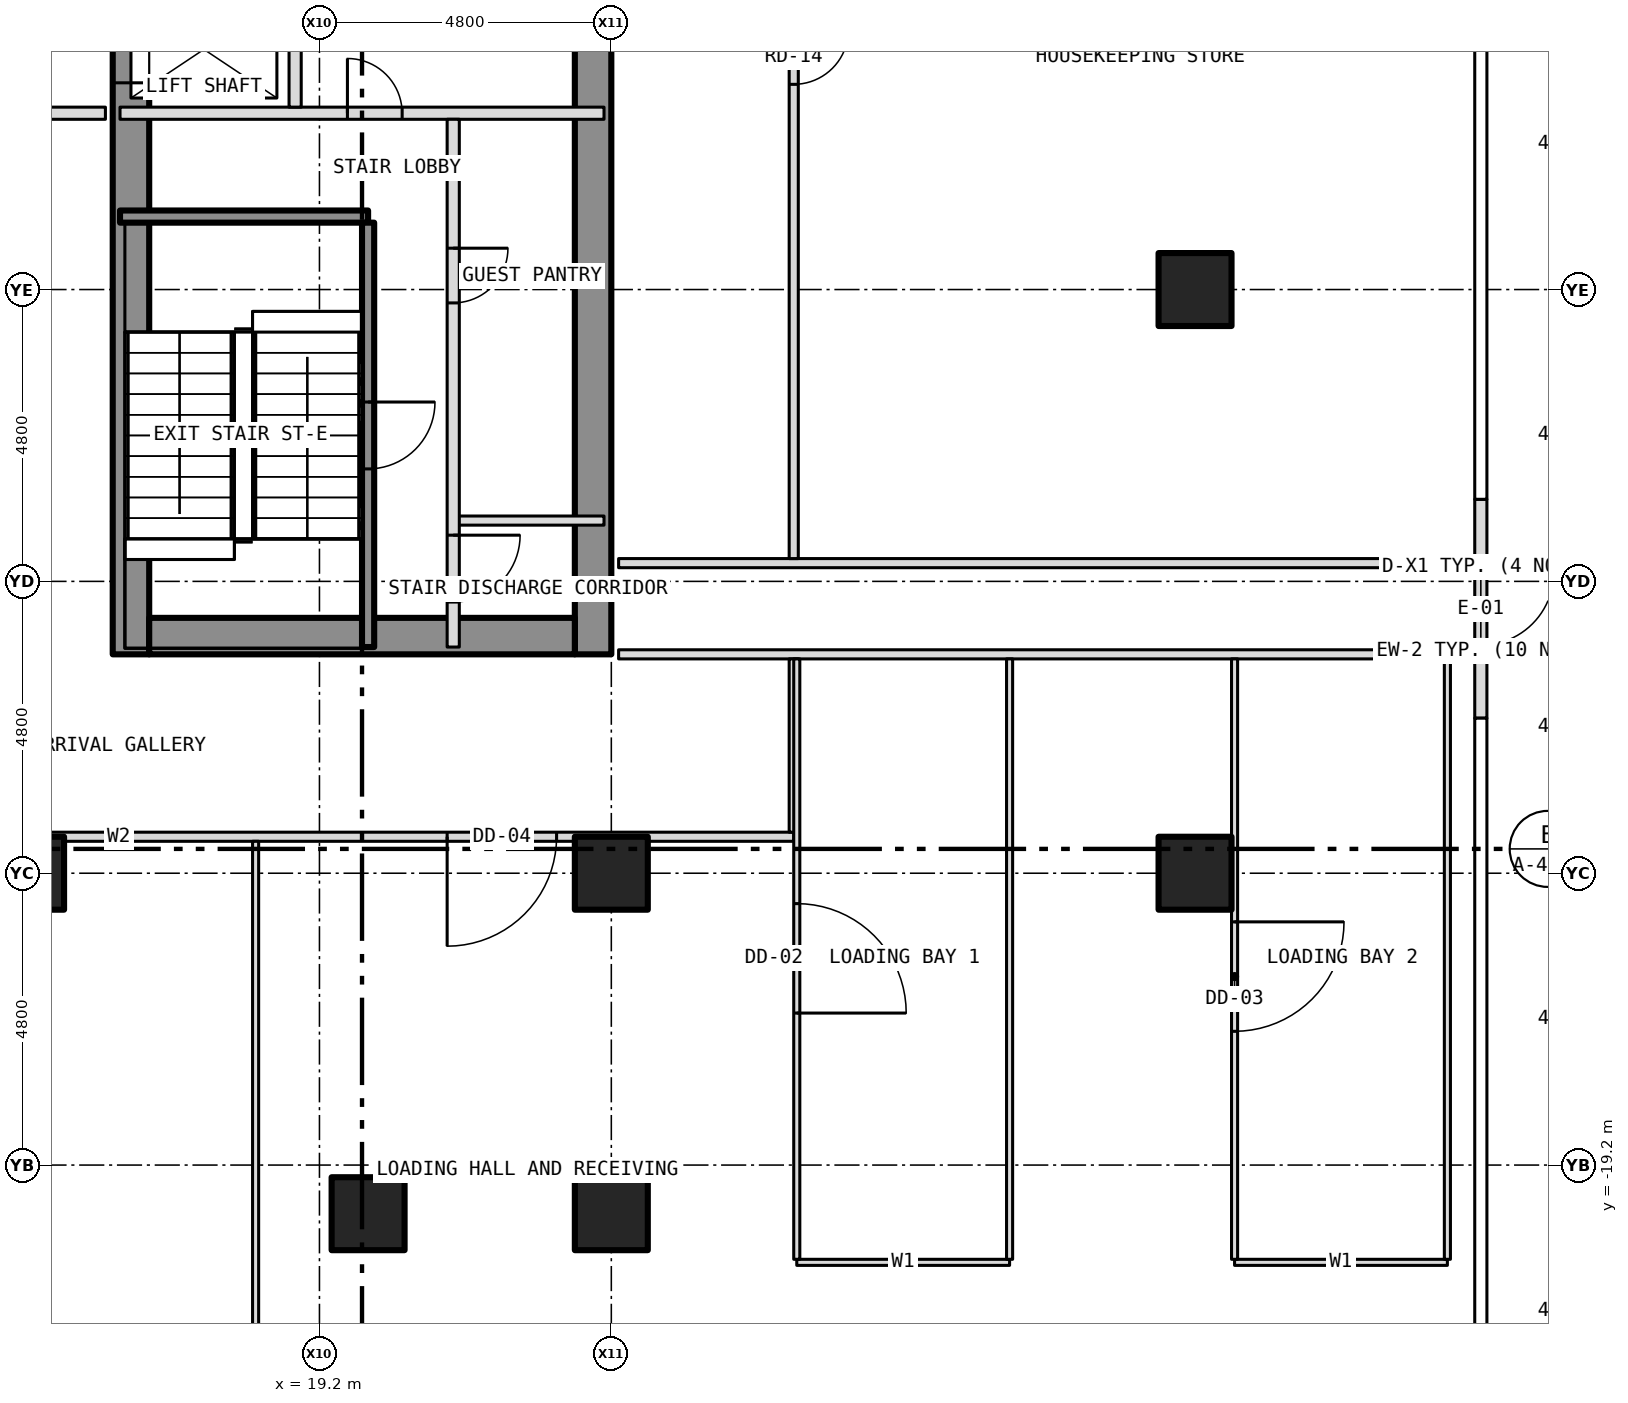
"""IFC4 building model, lengths in metres.
Left out: names, types, materials, properties, quantities, classifications, styles, units other than length and angle.
Written with IfcOpenShell. Run it as: python <this file> out.ifc"""

import sys

from ifc_helpers import new_model, si_unit, direction, frame, frame_2d, origin, origin_2d, place, context, subcontext, project, spatial, rectangle, hollow_rectangle, extrude, element, fill, save


model = new_model("IFC4")
c1 = context("Model", 3, precision=1e-05, world=origin(), true_north=direction((0.0, 1.0)))
c2 = subcontext(c1, "Body", "Model", "MODEL_VIEW")
j1 = project(units=[si_unit("LENGTHUNIT", "METRE"), si_unit("PLANEANGLEUNIT", "RADIAN")], contexts=[c1])
p1 = place(None, origin())
s1 = spatial("IfcSite", under=j1, at=p1, CompositionType="ELEMENT")
p2 = place(p1, origin())
s2 = spatial("IfcBuilding", under=s1, at=p2, CompositionType="ELEMENT")
p3 = place(p2, origin())
s3 = spatial("IfcBuildingStorey", under=s2, at=p3, CompositionType="ELEMENT", Elevation=0.0)
for number, where, z_axis, x_axis in (
    (1, (33.6, -14.4, -0.3), (0.0, 0.0, 1.0), (1.0, 0.0, 0.0)),
    (2, (33.6, -4.8, -0.3), (0.0, 0.0, 1.0), (1.0, 0.0, 0.0)),
    (3, (14.4, -14.4, -0.3), (0.0, 0.0, 1.0), (1.0, 0.0, 0.0)),
    (4, (20.0, -20.0, -0.3), (0.0, 0.0, 1.0), (1.0, 0.0, 0.0)),
    (5, (24.0, -20.0, -0.3), (0.0, 0.0, 1.0), (1.0, 0.0, 0.0)),
    (6, (24.0, -14.4, -0.3), (0.0, 0.0, 1.0), (1.0, 0.0, 0.0)),
):
    element("IfcColumn", number, at=place(p3, frame(where, z_axis=z_axis, x_axis=x_axis)), inside=s3, PredefinedType="COLUMN", context=c2, shape_type="SweptSolid", body=[
        extrude(hollow_rectangle(XDim=1.2, YDim=1.2, WallThickness=0.07, at=origin_2d()), origin(), (0.0, 0.0, 1.0), 7.55),
    ])
p4 = place(p3, frame((16.1, -10.8, 0.0), z_axis=(0.0, 0.0, 1.0), x_axis=(0.0, 1.0, 0.0)))
e7 = element("IfcWall", 7, at=p4, inside=s3, PredefinedType="SHEAR", context=c2, shape_type="SweptSolid", body=[
    extrude(rectangle(XDim=21.6, YDim=0.6, at=frame_2d((10.8, 0.0))), origin(), (0.0, 0.0, 1.0), 7.2),
])
p5 = place(p4, frame((9.4, 0.0, 0.0)))
e8 = element("IfcOpeningElement", 8, at=p5, cuts=e7, PredefinedType="OPENING", context=c2, shape_type="SweptSolid", body=[
    extrude(rectangle(XDim=1.1, YDim=2.1, at=frame_2d((0.55, 1.05))), frame((0.0, 0.312, 0.0), z_axis=(0.0, -1.0, 0.0), x_axis=(1.0, 0.0, 0.0)), (0.0, 0.0, 1.0), 0.624),
])
p6 = place(p4, frame((11.5, 0.0, 0.0)))
e9 = element("IfcOpeningElement", 9, at=p6, cuts=e7, PredefinedType="OPENING", context=c2, shape_type="SweptSolid", body=[
    extrude(rectangle(XDim=1.1, YDim=2.1, at=frame_2d((0.55, 1.05))), frame((0.0, 0.312, 0.0), z_axis=(0.0, -1.0, 0.0), x_axis=(1.0, 0.0, 0.0)), (0.0, 0.0, 1.0), 0.624),
])
p7 = place(p4, frame((13.6, 0.0, 0.0)))
e10 = element("IfcOpeningElement", 10, at=p7, cuts=e7, PredefinedType="OPENING", context=c2, shape_type="SweptSolid", body=[
    extrude(rectangle(XDim=1.1, YDim=2.1, at=frame_2d((0.55, 1.05))), frame((0.0, 0.312, 0.0), z_axis=(0.0, -1.0, 0.0), x_axis=(1.0, 0.0, 0.0)), (0.0, 0.0, 1.0), 0.624),
])
p8 = place(p4, frame((15.7, 0.0, 0.0)))
e11 = element("IfcOpeningElement", 11, at=p8, cuts=e7, PredefinedType="OPENING", context=c2, shape_type="SweptSolid", body=[
    extrude(rectangle(XDim=1.1, YDim=2.1, at=frame_2d((0.55, 1.05))), frame((0.0, 0.312, 0.0), z_axis=(0.0, -1.0, 0.0), x_axis=(1.0, 0.0, 0.0)), (0.0, 0.0, 1.0), 0.624),
])
p9 = place(p4, frame((17.8, 0.0, 0.0)))
e12 = element("IfcOpeningElement", 12, at=p9, cuts=e7, PredefinedType="OPENING", context=c2, shape_type="SweptSolid", body=[
    extrude(rectangle(XDim=1.1, YDim=2.1, at=frame_2d((0.55, 1.05))), frame((0.0, 0.312, 0.0), z_axis=(0.0, -1.0, 0.0), x_axis=(1.0, 0.0, 0.0)), (0.0, 0.0, 1.0), 0.624),
])
p10 = place(p4, frame((19.9, 0.0, 0.0)))
e13 = element("IfcOpeningElement", 13, at=p10, cuts=e7, PredefinedType="OPENING", context=c2, shape_type="SweptSolid", body=[
    extrude(rectangle(XDim=1.1, YDim=2.1, at=frame_2d((0.55, 1.05))), frame((0.0, 0.312, 0.0), z_axis=(0.0, -1.0, 0.0), x_axis=(1.0, 0.0, 0.0)), (0.0, 0.0, 1.0), 0.624),
])
p11 = place(p3, frame((23.7, -10.8, 0.0), z_axis=(0.0, 0.0, 1.0), x_axis=(0.0, 1.0, 0.0)))
e14 = element("IfcWall", 14, at=p11, inside=s3, PredefinedType="SHEAR", context=c2, shape_type="SweptSolid", body=[
    extrude(rectangle(XDim=21.6, YDim=0.6, at=frame_2d((10.8, 0.0))), origin(), (0.0, 0.0, 1.0), 7.2),
])
p12 = place(p3, frame((16.4, -10.5, 0.0), z_axis=(0.0, 0.0, 1.0), x_axis=(1.0, 0.0, 0.0)))
e15 = element("IfcWall", 15, at=p12, inside=s3, PredefinedType="SHEAR", context=c2, shape_type="SweptSolid", body=[
    extrude(rectangle(XDim=7.0, YDim=0.6, at=frame_2d((3.5, 0.0))), origin(), (0.0, 0.0, 1.0), 7.2),
])
p13 = place(p3, frame((38.3, -8.25, 0.0), z_axis=(0.0, 0.0, 1.0), x_axis=(0.0, -1.0, 0.0)))
e16 = element("IfcWall", 16, at=p13, inside=s3, PredefinedType="SOLIDWALL", context=c2, shape_type="SweptSolid", body=[
    extrude(rectangle(XDim=3.6, YDim=0.2, at=frame_2d((1.8, 0.0))), origin(), (0.0, 0.0, 1.0), 6.628),
])
p14 = place(p13, frame((1.2, 0.0, 0.0)))
e17 = element("IfcOpeningElement", 17, at=p14, cuts=e16, PredefinedType="OPENING", context=c2, shape_type="SweptSolid", body=[
    extrude(rectangle(XDim=1.2, YDim=2.4, at=frame_2d((0.6, 1.2))), frame((0.0, 0.112, 0.0), z_axis=(0.0, -1.0, 0.0), x_axis=(1.0, 0.0, 0.0)), (0.0, 0.0, 1.0), 0.224),
])
for number, where, z_axis, x_axis in (
    (18, (27.05, -20.8, 0.0), (0.0, 0.0, 1.0), (1.0, 0.0, 0.0)),
    (19, (34.25, -20.8, 0.0), (0.0, 0.0, 1.0), (1.0, 0.0, 0.0)),
):
    element("IfcWall", number, at=place(p3, frame(where, z_axis=z_axis, x_axis=x_axis)), inside=s3, PredefinedType="PARTITIONING", context=c2, shape_type="SweptSolid", body=[
        extrude(rectangle(XDim=3.5, YDim=0.1, at=frame_2d((1.75, 0.0))), origin(), (0.0, 0.0, 1.0), 7.25),
    ])
p15 = place(p3, frame((4.8, -13.8, 0.0), z_axis=(0.0, 0.0, 1.0), x_axis=(1.0, 0.0, 0.0)))
e20 = element("IfcWall", 20, at=p15, inside=s3, PredefinedType="PARTITIONING", context=c2, shape_type="SweptSolid", body=[
    extrude(rectangle(XDim=22.2, YDim=0.15, at=frame_2d((11.1, 0.0))), origin(), (0.0, 0.0, 1.0), 7.25),
])
p16 = place(p15, frame((8.036, 0.0, 0.0)))
e21 = element("IfcOpeningElement", 21, at=p16, cuts=e20, PredefinedType="OPENING", context=c2, shape_type="SweptSolid", body=[
    extrude(rectangle(XDim=0.9, YDim=2.1, at=frame_2d((0.45, 1.05))), frame((0.0, 0.087, 0.0), z_axis=(0.0, -1.0, 0.0), x_axis=(1.0, 0.0, 0.0)), (0.0, 0.0, 1.0), 0.174),
])
p17 = place(p15, frame((16.5, 0.0, 0.0)))
e22 = element("IfcOpeningElement", 22, at=p17, cuts=e20, PredefinedType="OPENING", context=c2, shape_type="SweptSolid", body=[
    extrude(rectangle(XDim=1.8, YDim=2.1, at=frame_2d((0.9, 1.05))), frame((0.0, 0.087, 0.0), z_axis=(0.0, -1.0, 0.0), x_axis=(1.0, 0.0, 0.0)), (0.0, 0.0, 1.0), 0.174),
])
for number, where, z_axis, x_axis in (
    (23, (24.12, -10.8, 0.0), (0.0, 0.0, 1.0), (1.0, 0.0, 0.0)),
    (24, (24.12, -9.3, 0.0), (0.0, 0.0, 1.0), (1.0, 0.0, 0.0)),
):
    element("IfcWall", number, at=place(p3, frame(where, z_axis=z_axis, x_axis=x_axis)), inside=s3, PredefinedType="PARTITIONING", context=c2, shape_type="SweptSolid", body=[
        extrude(rectangle(XDim=12.78, YDim=0.15, at=frame_2d((6.39, 0.0))), origin(), (0.0, 0.0, 1.0), 7.25),
    ])
p18 = place(p3, frame((21.4, -8.6, 0.0), z_axis=(0.0, 0.0, 1.0), x_axis=(1.0, 0.0, 0.0)))
e25 = element("IfcWall", 25, at=p18, inside=s3, PredefinedType="PARTITIONING", context=c2, shape_type="SweptSolid", body=[
    extrude(rectangle(XDim=2.48, YDim=0.15, at=frame_2d((1.24, 0.0))), origin(), (0.0, 0.0, 1.0), 7.2),
])
p19 = place(p3, frame((15.92, -3.6, 0.0), z_axis=(0.0, 0.0, 1.0), x_axis=(1.0, 0.0, 0.0)))
e26 = element("IfcWall", 26, at=p19, inside=s3, PredefinedType="SHEAR", context=c2, shape_type="SweptSolid", body=[
    extrude(rectangle(XDim=4.08, YDim=0.2, at=frame_2d((2.04, 0.0))), origin(), (0.0, 0.0, 1.0), 7.2),
])
p20 = place(p3, frame((12.4, -1.9, 0.0), z_axis=(0.0, 0.0, 1.0), x_axis=(1.0, 0.0, 0.0)))
e27 = element("IfcWall", 27, at=p20, inside=s3, PredefinedType="PARTITIONING", context=c2, shape_type="SweptSolid", body=[
    extrude(rectangle(XDim=3.28, YDim=0.2, at=frame_2d((1.64, 0.0))), origin(), (0.0, 0.0, 1.0), 7.25),
])
p21 = place(p3, frame((15.92, -1.9, 0.0), z_axis=(0.0, 0.0, 1.0), x_axis=(1.0, 0.0, 0.0)))
e28 = element("IfcWall", 28, at=p21, inside=s3, PredefinedType="PARTITIONING", context=c2, shape_type="SweptSolid", body=[
    extrude(rectangle(XDim=7.96, YDim=0.2, at=frame_2d((3.98, 0.0))), origin(), (0.0, 0.0, 1.0), 7.2),
])
p22 = place(p21, frame((3.74, 0.0, 0.0)))
e29 = element("IfcOpeningElement", 29, at=p22, cuts=e28, PredefinedType="OPENING", context=c2, shape_type="SweptSolid", body=[
    extrude(rectangle(XDim=0.9, YDim=2.1, at=frame_2d((0.45, 1.05))), frame((0.0, 0.112, 0.0), z_axis=(0.0, -1.0, 0.0), x_axis=(1.0, 0.0, 0.0)), (0.0, 0.0, 1.0), 0.224),
])
p23 = place(p3, frame((18.15, -24.63, 0.0), z_axis=(0.0, 0.0, 1.0), x_axis=(0.0, 1.0, 0.0)))
e30 = element("IfcWall", 30, at=p23, inside=s3, PredefinedType="PARTITIONING", context=c2, shape_type="SweptSolid", body=[
    extrude(rectangle(XDim=10.755, YDim=0.1, at=frame_2d((5.377, 0.0))), origin(), (0.0, 0.0, 1.0), 7.25),
])
p24 = place(p3, frame((18.8, -1.8, 0.0), z_axis=(0.0, 0.0, 1.0), x_axis=(0.0, 1.0, 0.0)))
e31 = element("IfcWall", 31, at=p24, inside=s3, PredefinedType="PARTITIONING", context=c2, shape_type="SweptSolid", body=[
    extrude(rectangle(XDim=12.48, YDim=0.2, at=frame_2d((6.24, 0.0))), origin(), (0.0, 0.0, 1.0), 7.2),
])
p25 = place(p3, frame((20.0, -10.68, 0.0), z_axis=(0.0, 0.0, 1.0), x_axis=(0.0, 1.0, 0.0)))
e32 = element("IfcWall", 32, at=p25, inside=s3, PredefinedType="SHEAR", context=c2, shape_type="SweptSolid", body=[
    extrude(rectangle(XDim=6.98, YDim=0.2, at=frame_2d((3.49, 0.0))), origin(), (0.0, 0.0, 1.0), 7.2),
])
p26 = place(p25, frame((2.93, 0.0, 0.0)))
e33 = element("IfcOpeningElement", 33, at=p26, cuts=e32, PredefinedType="OPENING", context=c2, shape_type="SweptSolid", body=[
    extrude(rectangle(XDim=1.1, YDim=2.1, at=frame_2d((0.55, 1.05))), frame((0.0, 0.112, 0.0), z_axis=(0.0, -1.0, 0.0), x_axis=(1.0, 0.0, 0.0)), (0.0, 0.0, 1.0), 0.224),
])
p27 = place(p3, frame((21.4, -10.68, 0.0), z_axis=(0.0, 0.0, 1.0), x_axis=(0.0, 1.0, 0.0)))
e34 = element("IfcWall", 34, at=p27, inside=s3, PredefinedType="PARTITIONING", context=c2, shape_type="SweptSolid", body=[
    extrude(rectangle(XDim=8.68, YDim=0.2, at=frame_2d((4.34, 0.0))), origin(), (0.0, 0.0, 1.0), 7.2),
])
p28 = place(p27, frame((5.66, 0.0, 0.0)))
e35 = element("IfcOpeningElement", 35, at=p28, cuts=e34, PredefinedType="OPENING", context=c2, shape_type="SweptSolid", body=[
    extrude(rectangle(XDim=0.9, YDim=2.1, at=frame_2d((0.45, 1.05))), frame((0.0, 0.112, 0.0), z_axis=(0.0, -1.0, 0.0), x_axis=(1.0, 0.0, 0.0)), (0.0, 0.0, 1.0), 0.224),
])
p29 = place(p27, frame((0.74, 0.0, 0.0)))
e36 = element("IfcOpeningElement", 36, at=p29, cuts=e34, PredefinedType="OPENING", context=c2, shape_type="SweptSolid", body=[
    extrude(rectangle(XDim=1.1, YDim=2.1, at=frame_2d((0.55, 1.05))), frame((0.0, 0.112, 0.0), z_axis=(0.0, -1.0, 0.0), x_axis=(1.0, 0.0, 0.0)), (0.0, 0.0, 1.0), 0.224),
])
p30 = place(p3, frame((27.0, -13.725, 0.0), z_axis=(0.0, 0.0, 1.0), x_axis=(0.0, 1.0, 0.0)))
e37 = element("IfcWall", 37, at=p30, inside=s3, PredefinedType="PARTITIONING", context=c2, shape_type="SweptSolid", body=[
    extrude(rectangle(XDim=2.85, YDim=0.15, at=frame_2d((1.425, 0.0))), origin(), (0.0, 0.0, 1.0), 7.25),
])
p31 = place(p3, frame((27.0, -9.225, 0.0), z_axis=(0.0, 0.0, 1.0), x_axis=(0.0, 1.0, 0.0)))
e38 = element("IfcWall", 38, at=p31, inside=s3, PredefinedType="PARTITIONING", context=c2, shape_type="SweptSolid", body=[
    extrude(rectangle(XDim=22.95, YDim=0.15, at=frame_2d((11.475, 0.0))), origin(), (0.0, 0.0, 1.0), 7.25),
])
p32 = place(p31, frame((7.8, 0.0, 0.0)))
e39 = element("IfcOpeningElement", 39, at=p32, cuts=e38, PredefinedType="OPENING", context=c2, shape_type="SweptSolid", body=[
    extrude(rectangle(XDim=0.9, YDim=2.1, at=frame_2d((0.45, 1.05))), frame((0.0, 0.087, 0.0), z_axis=(0.0, -1.0, 0.0), x_axis=(1.0, 0.0, 0.0)), (0.0, 0.0, 1.0), 0.174),
])
p33 = place(p31, frame((19.35, 0.0, 0.0)))
e40 = element("IfcOpeningElement", 40, at=p33, cuts=e38, PredefinedType="OPENING", context=c2, shape_type="SweptSolid", body=[
    extrude(rectangle(XDim=0.9, YDim=2.1, at=frame_2d((0.45, 1.05))), frame((0.0, 0.087, 0.0), z_axis=(0.0, -1.0, 0.0), x_axis=(1.0, 0.0, 0.0)), (0.0, 0.0, 1.0), 0.174),
])
p34 = place(p3, frame((27.05, -20.75, 0.0), z_axis=(0.0, 0.0, 1.0), x_axis=(0.0, 1.0, 0.0)))
e41 = element("IfcWall", 41, at=p34, inside=s3, PredefinedType="PARTITIONING", context=c2, shape_type="SweptSolid", body=[
    extrude(rectangle(XDim=9.875, YDim=0.1, at=frame_2d((4.938, 0.0))), origin(), (0.0, 0.0, 1.0), 7.25),
])
p35 = place(p34, frame((4.05, 0.0, 0.0)))
e42 = element("IfcOpeningElement", 42, at=p35, cuts=e41, PredefinedType="OPENING", context=c2, shape_type="SweptSolid", body=[
    extrude(rectangle(XDim=1.8, YDim=2.1, at=frame_2d((0.9, 1.05))), frame((0.0, 0.062, 0.0), z_axis=(0.0, -1.0, 0.0), x_axis=(1.0, 0.0, 0.0)), (0.0, 0.0, 1.0), 0.124),
])
p36 = place(p3, frame((30.55, -20.75, 0.0), z_axis=(0.0, 0.0, 1.0), x_axis=(0.0, 1.0, 0.0)))
e43 = element("IfcWall", 43, at=p36, inside=s3, PredefinedType="PARTITIONING", context=c2, shape_type="SweptSolid", body=[
    extrude(rectangle(XDim=9.875, YDim=0.1, at=frame_2d((4.938, 0.0))), origin(), (0.0, 0.0, 1.0), 7.25),
])
p37 = place(p3, frame((34.25, -20.75, 0.0), z_axis=(0.0, 0.0, 1.0), x_axis=(0.0, 1.0, 0.0)))
e44 = element("IfcWall", 44, at=p37, inside=s3, PredefinedType="PARTITIONING", context=c2, shape_type="SweptSolid", body=[
    extrude(rectangle(XDim=9.875, YDim=0.1, at=frame_2d((4.938, 0.0))), origin(), (0.0, 0.0, 1.0), 7.25),
])
p38 = place(p37, frame((3.75, 0.0, 0.0)))
e45 = element("IfcOpeningElement", 45, at=p38, cuts=e44, PredefinedType="OPENING", context=c2, shape_type="SweptSolid", body=[
    extrude(rectangle(XDim=1.8, YDim=2.1, at=frame_2d((0.9, 1.05))), frame((0.0, 0.062, 0.0), z_axis=(0.0, -1.0, 0.0), x_axis=(1.0, 0.0, 0.0)), (0.0, 0.0, 1.0), 0.124),
])
p39 = place(p3, frame((37.75, -20.75, 0.0), z_axis=(0.0, 0.0, 1.0), x_axis=(0.0, 1.0, 0.0)))
e46 = element("IfcWall", 46, at=p39, inside=s3, PredefinedType="PARTITIONING", context=c2, shape_type="SweptSolid", body=[
    extrude(rectangle(XDim=9.9, YDim=0.1, at=frame_2d((4.95, 0.0))), origin(), (0.0, 0.0, 1.0), 7.25),
])
p40 = place(p14, origin())
e47 = element("IfcDoor", 47, at=p40, inside=s3, OperationType="SINGLE_SWING_LEFT", PredefinedType="DOOR", context=c2, shape_type="SweptSolid", body=[
    extrude(rectangle(XDim=1.2, YDim=2.4, at=frame_2d((0.6, 1.2))), frame((0.0, 0.025, 0.0), z_axis=(0.0, -1.0, 0.0), x_axis=(1.0, 0.0, 0.0)), (0.0, 0.0, 1.0), 0.05),
])
fill(e17, e47)
p41 = place(p5, origin())
e48 = element("IfcDoor", 48, at=p41, inside=s3, OperationType="SLIDING_TO_LEFT", PredefinedType="DOOR", context=c2, shape_type="SweptSolid", body=[
    extrude(rectangle(XDim=1.1, YDim=2.1, at=frame_2d((0.55, 1.05))), frame((0.0, 0.025, 0.0), z_axis=(0.0, -1.0, 0.0), x_axis=(1.0, 0.0, 0.0)), (0.0, 0.0, 1.0), 0.05),
])
fill(e8, e48)
p42 = place(p28, origin())
e49 = element("IfcDoor", 49, at=p42, inside=s3, OperationType="SINGLE_SWING_RIGHT", PredefinedType="DOOR", context=c2, shape_type="SweptSolid", body=[
    extrude(rectangle(XDim=0.9, YDim=2.1, at=frame_2d((0.45, 1.05))), frame((0.0, 0.025, 0.0), z_axis=(0.0, -1.0, 0.0), x_axis=(1.0, 0.0, 0.0)), (0.0, 0.0, 1.0), 0.05),
])
fill(e35, e49)
p43 = place(p22, origin())
e50 = element("IfcDoor", 50, at=p43, inside=s3, OperationType="SINGLE_SWING_LEFT", PredefinedType="DOOR", context=c2, shape_type="SweptSolid", body=[
    extrude(rectangle(XDim=0.9, YDim=2.1, at=frame_2d((0.45, 1.05))), frame((0.0, 0.025, 0.0), z_axis=(0.0, -1.0, 0.0), x_axis=(1.0, 0.0, 0.0)), (0.0, 0.0, 1.0), 0.05),
])
fill(e29, e50)
p44 = place(p29, origin())
e51 = element("IfcDoor", 51, at=p44, inside=s3, OperationType="SINGLE_SWING_RIGHT", PredefinedType="DOOR", context=c2, shape_type="SweptSolid", body=[
    extrude(rectangle(XDim=1.1, YDim=2.1, at=frame_2d((0.55, 1.05))), frame((0.0, 0.025, 0.0), z_axis=(0.0, -1.0, 0.0), x_axis=(1.0, 0.0, 0.0)), (0.0, 0.0, 1.0), 0.05),
])
fill(e36, e51)
p45 = place(p26, origin())
e52 = element("IfcDoor", 52, at=p45, inside=s3, OperationType="SINGLE_SWING_RIGHT", PredefinedType="DOOR", context=c2, shape_type="SweptSolid", body=[
    extrude(rectangle(XDim=1.1, YDim=2.1, at=frame_2d((0.55, 1.05))), frame((0.0, 0.025, 0.0), z_axis=(0.0, -1.0, 0.0), x_axis=(1.0, 0.0, 0.0)), (0.0, 0.0, 1.0), 0.05),
])
fill(e33, e52)
p46 = place(p35, origin())
e53 = element("IfcDoor", 53, at=p46, inside=s3, OperationType="DOUBLE_DOOR_SINGLE_SWING", PredefinedType="DOOR", context=c2, shape_type="SweptSolid", body=[
    extrude(rectangle(XDim=1.8, YDim=2.1, at=frame_2d((0.9, 1.05))), frame((0.0, 0.025, 0.0), z_axis=(0.0, -1.0, 0.0), x_axis=(1.0, 0.0, 0.0)), (0.0, 0.0, 1.0), 0.05),
])
fill(e42, e53)
p47 = place(p38, origin())
e54 = element("IfcDoor", 54, at=p47, inside=s3, OperationType="DOUBLE_DOOR_SINGLE_SWING", PredefinedType="DOOR", context=c2, shape_type="SweptSolid", body=[
    extrude(rectangle(XDim=1.8, YDim=2.1, at=frame_2d((0.9, 1.05))), frame((0.0, 0.025, 0.0), z_axis=(0.0, -1.0, 0.0), x_axis=(1.0, 0.0, 0.0)), (0.0, 0.0, 1.0), 0.05),
])
fill(e45, e54)
p48 = place(p17, origin())
e55 = element("IfcDoor", 55, at=p48, inside=s3, OperationType="DOUBLE_DOOR_SINGLE_SWING", PredefinedType="DOOR", context=c2, shape_type="SweptSolid", body=[
    extrude(rectangle(XDim=1.8, YDim=2.1, at=frame_2d((0.9, 1.05))), frame((0.0, 0.025, 0.0), z_axis=(0.0, -1.0, 0.0), x_axis=(1.0, 0.0, 0.0)), (0.0, 0.0, 1.0), 0.05),
])
fill(e22, e55)
p49 = place(p32, origin())
e56 = element("IfcDoor", 56, at=p49, inside=s3, OperationType="SINGLE_SWING_RIGHT", PredefinedType="DOOR", context=c2, shape_type="SweptSolid", body=[
    extrude(rectangle(XDim=0.9, YDim=2.1, at=frame_2d((0.45, 1.05))), frame((0.0, 0.025, 0.0), z_axis=(0.0, -1.0, 0.0), x_axis=(1.0, 0.0, 0.0)), (0.0, 0.0, 1.0), 0.05),
])
fill(e39, e56)
save(model, sys.argv[1])
